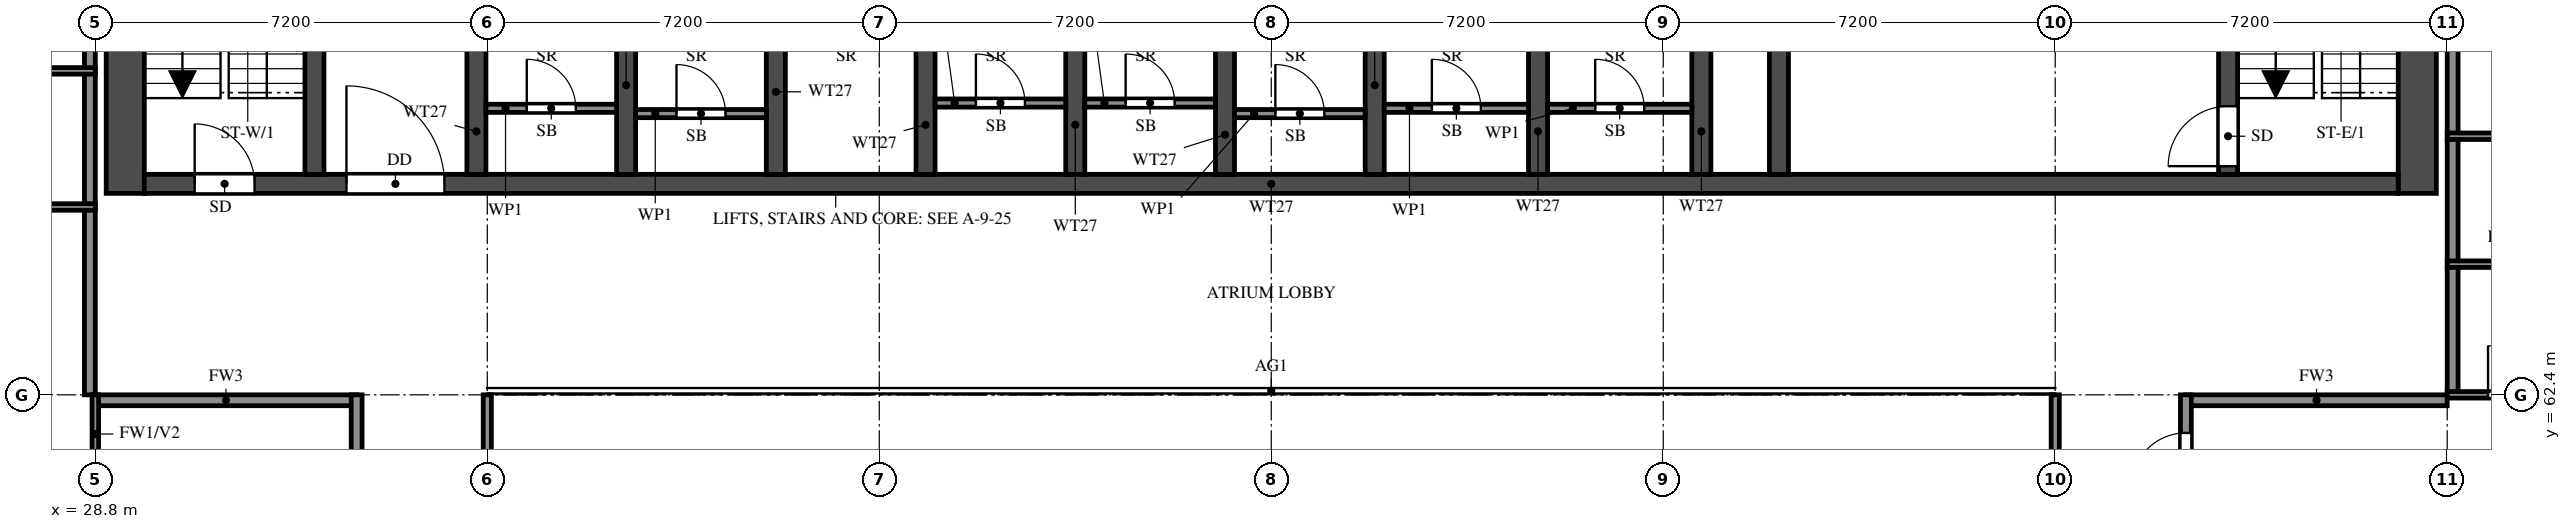
"""IFC4 building model, lengths in metres.
Left out: names, types, materials, properties, quantities, classifications, styles, units other than length and angle.
Written with IfcOpenShell. Run it as: python <this file> out.ifc"""

import sys

from ifc_helpers import new_model, si_unit, direction, frame, frame_2d, origin, place, context, subcontext, project, spatial, rectangle, extrude, element, fill, save


model = new_model("IFC4")
c1 = context("Model", 3, precision=1e-05, world=origin(), true_north=direction((0.0, 1.0)))
c2 = subcontext(c1, "Body", "Model", "MODEL_VIEW")
j1 = project(units=[si_unit("LENGTHUNIT", "METRE"), si_unit("PLANEANGLEUNIT", "RADIAN")], contexts=[c1])
p1 = place(None, origin())
s1 = spatial("IfcSite", under=j1, at=p1, CompositionType="ELEMENT")
p2 = place(p1, origin())
s2 = spatial("IfcBuilding", under=s1, at=p2, CompositionType="ELEMENT")
p3 = place(p2, frame((0.0, 0.0, 185.0)))
s3 = spatial("IfcBuildingStorey", under=s2, at=p3, CompositionType="ELEMENT", Elevation=185.0)
for number, where, z_axis, x_axis in (
    (1, (29.35, 66.1, 0.0), (0.0, 0.0, 1.0), (0.0, 1.0, 0.0)),
    (2, (71.45, 66.1, 0.0), (0.0, 0.0, 1.0), (0.0, 1.0, 0.0)),
):
    element("IfcWall", number, at=place(p3, frame(where, z_axis=z_axis, x_axis=x_axis)), inside=s3, PredefinedType="SHEAR", context=c2, shape_type="SweptSolid", body=[
        extrude(rectangle(XDim=11.9, YDim=0.7, at=frame_2d((5.95, 0.0))), origin(), (0.0, 0.0, 1.0), 3.2),
    ])
p4 = place(p3, frame((29.7, 66.275, 0.0), z_axis=(0.0, 0.0, 1.0), x_axis=(1.0, 0.0, 0.0)))
e3 = element("IfcWall", 3, at=p4, inside=s3, PredefinedType="SHEAR", context=c2, shape_type="SweptSolid", body=[
    extrude(rectangle(XDim=41.4, YDim=0.35, at=frame_2d((20.7, 0.0))), origin(), (0.0, 0.0, 1.0), 3.2),
])
p5 = place(p4, frame((0.925, 0.0, 0.0)))
e4 = element("IfcOpeningElement", 4, at=p5, cuts=e3, PredefinedType="OPENING", context=c2, shape_type="SweptSolid", body=[
    extrude(rectangle(XDim=1.1, YDim=2.1, at=frame_2d((0.55, 1.05))), frame((0.0, 0.185, 0.0), z_axis=(0.0, -1.0, 0.0), x_axis=(1.0, 0.0, 0.0)), (0.0, 0.0, 1.0), 0.37),
])
p6 = place(p4, frame((3.712, 0.0, 0.0)))
e5 = element("IfcOpeningElement", 5, at=p6, cuts=e3, PredefinedType="OPENING", context=c2, shape_type="SweptSolid", body=[
    extrude(rectangle(XDim=1.8, YDim=2.1, at=frame_2d((0.9, 1.05))), frame((0.0, 0.185, 0.0), z_axis=(0.0, -1.0, 0.0), x_axis=(1.0, 0.0, 0.0)), (0.0, 0.0, 1.0), 0.37),
])
p7 = place(p3, frame((32.825, 66.45, 0.0), z_axis=(0.0, 0.0, 1.0), x_axis=(0.0, 1.0, 0.0)))
e6 = element("IfcWall", 6, at=p7, inside=s3, PredefinedType="SHEAR", context=c2, shape_type="SweptSolid", body=[
    extrude(rectangle(XDim=10.85, YDim=0.35, at=frame_2d((5.425, 0.0))), origin(), (0.0, 0.0, 1.0), 3.2),
])
p8 = place(p3, frame((67.975, 66.45, 0.0), z_axis=(0.0, 0.0, 1.0), x_axis=(0.0, 1.0, 0.0)))
e7 = element("IfcWall", 7, at=p8, inside=s3, PredefinedType="SHEAR", context=c2, shape_type="SweptSolid", body=[
    extrude(rectangle(XDim=10.85, YDim=0.35, at=frame_2d((5.425, 0.0))), origin(), (0.0, 0.0, 1.0), 3.2),
])
p9 = place(p8, frame((0.15, 0.0, 0.0)))
e8 = element("IfcOpeningElement", 8, at=p9, cuts=e7, PredefinedType="OPENING", context=c2, shape_type="SweptSolid", body=[
    extrude(rectangle(XDim=1.1, YDim=2.1, at=frame_2d((0.55, 1.05))), frame((0.0, 0.185, 0.0), z_axis=(0.0, -1.0, 0.0), x_axis=(1.0, 0.0, 0.0)), (0.0, 0.0, 1.0), 0.37),
])
p10 = place(p3, frame((59.725, 66.45, 0.0), z_axis=(0.0, 0.0, 1.0), x_axis=(0.0, 1.0, 0.0)))
e9 = element("IfcWall", 9, at=p10, inside=s3, PredefinedType="SHEAR", context=c2, shape_type="SweptSolid", body=[
    extrude(rectangle(XDim=6.125, YDim=0.35, at=frame_2d((3.062, 0.0))), origin(), (0.0, 0.0, 1.0), 3.2),
])
p11 = place(p10, frame((3.85, 0.0, 0.0)))
e10 = element("IfcOpeningElement", 10, at=p11, cuts=e9, PredefinedType="OPENING", context=c2, shape_type="SweptSolid", body=[
    extrude(rectangle(XDim=1.2, YDim=2.1, at=frame_2d((0.6, 1.05))), frame((0.0, 0.185, 0.0), z_axis=(0.0, -1.0, 0.0), x_axis=(1.0, 0.0, 0.0)), (0.0, 0.0, 1.0), 0.37),
])
for number, where, z_axis, x_axis in (
    (11, (35.8, 66.45, 0.0), (0.0, 0.0, 1.0), (0.0, 1.0, 0.0)),
    (12, (38.55, 66.45, 0.0), (0.0, 0.0, 1.0), (0.0, 1.0, 0.0)),
    (13, (41.3, 66.45, 0.0), (0.0, 0.0, 1.0), (0.0, 1.0, 0.0)),
    (14, (44.05, 66.45, 0.0), (0.0, 0.0, 1.0), (0.0, 1.0, 0.0)),
    (15, (46.8, 66.45, 0.0), (0.0, 0.0, 1.0), (0.0, 1.0, 0.0)),
    (16, (49.55, 66.45, 0.0), (0.0, 0.0, 1.0), (0.0, 1.0, 0.0)),
    (17, (52.3, 66.45, 0.0), (0.0, 0.0, 1.0), (0.0, 1.0, 0.0)),
    (18, (55.3, 66.45, 0.0), (0.0, 0.0, 1.0), (0.0, 1.0, 0.0)),
    (19, (58.3, 66.45, 0.0), (0.0, 0.0, 1.0), (0.0, 1.0, 0.0)),
):
    element("IfcWall", number, at=place(p3, frame(where, z_axis=z_axis, x_axis=x_axis)), inside=s3, PredefinedType="SHEAR", context=c2, shape_type="SweptSolid", body=[
        extrude(rectangle(XDim=2.425, YDim=0.35, at=frame_2d((1.212, 0.0))), origin(), (0.0, 0.0, 1.0), 3.2),
    ])
p12 = place(p3, frame((35.975, 67.663, 0.0), z_axis=(0.0, 0.0, 1.0), x_axis=(1.0, 0.0, 0.0)))
e20 = element("IfcWall", 20, at=p12, inside=s3, PredefinedType="PARTITIONING", context=c2, shape_type="SweptSolid", body=[
    extrude(rectangle(XDim=2.4, YDim=0.15, at=frame_2d((1.2, 0.0))), origin(), (0.0, 0.0, 1.0), 3.2),
])
p13 = place(p12, frame((0.75, 0.0, 0.0)))
e21 = element("IfcOpeningElement", 21, at=p13, cuts=e20, PredefinedType="OPENING", context=c2, shape_type="SweptSolid", body=[
    extrude(rectangle(XDim=0.9, YDim=2.1, at=frame_2d((0.45, 1.05))), frame((0.0, 0.085, 0.0), z_axis=(0.0, -1.0, 0.0), x_axis=(1.0, 0.0, 0.0)), (0.0, 0.0, 1.0), 0.17),
])
p14 = place(p3, frame((38.725, 67.565, 0.0), z_axis=(0.0, 0.0, 1.0), x_axis=(1.0, 0.0, 0.0)))
e22 = element("IfcWall", 22, at=p14, inside=s3, PredefinedType="PARTITIONING", context=c2, shape_type="SweptSolid", body=[
    extrude(rectangle(XDim=2.4, YDim=0.15, at=frame_2d((1.2, 0.0))), origin(), (0.0, 0.0, 1.0), 3.2),
])
p15 = place(p14, frame((0.75, 0.0, 0.0)))
e23 = element("IfcOpeningElement", 23, at=p15, cuts=e22, PredefinedType="OPENING", context=c2, shape_type="SweptSolid", body=[
    extrude(rectangle(XDim=0.9, YDim=2.1, at=frame_2d((0.45, 1.05))), frame((0.0, 0.085, 0.0), z_axis=(0.0, -1.0, 0.0), x_axis=(1.0, 0.0, 0.0)), (0.0, 0.0, 1.0), 0.17),
])
p16 = place(p3, frame((44.225, 67.76, 0.0), z_axis=(0.0, 0.0, 1.0), x_axis=(1.0, 0.0, 0.0)))
e24 = element("IfcWall", 24, at=p16, inside=s3, PredefinedType="PARTITIONING", context=c2, shape_type="SweptSolid", body=[
    extrude(rectangle(XDim=2.4, YDim=0.15, at=frame_2d((1.2, 0.0))), origin(), (0.0, 0.0, 1.0), 3.2),
])
p17 = place(p16, frame((0.75, 0.0, 0.0)))
e25 = element("IfcOpeningElement", 25, at=p17, cuts=e24, PredefinedType="OPENING", context=c2, shape_type="SweptSolid", body=[
    extrude(rectangle(XDim=0.9, YDim=2.1, at=frame_2d((0.45, 1.05))), frame((0.0, 0.085, 0.0), z_axis=(0.0, -1.0, 0.0), x_axis=(1.0, 0.0, 0.0)), (0.0, 0.0, 1.0), 0.17),
])
p18 = place(p3, frame((46.975, 67.76, 0.0), z_axis=(0.0, 0.0, 1.0), x_axis=(1.0, 0.0, 0.0)))
e26 = element("IfcWall", 26, at=p18, inside=s3, PredefinedType="PARTITIONING", context=c2, shape_type="SweptSolid", body=[
    extrude(rectangle(XDim=2.4, YDim=0.15, at=frame_2d((1.2, 0.0))), origin(), (0.0, 0.0, 1.0), 3.2),
])
p19 = place(p18, frame((0.75, 0.0, 0.0)))
e27 = element("IfcOpeningElement", 27, at=p19, cuts=e26, PredefinedType="OPENING", context=c2, shape_type="SweptSolid", body=[
    extrude(rectangle(XDim=0.9, YDim=2.1, at=frame_2d((0.45, 1.05))), frame((0.0, 0.085, 0.0), z_axis=(0.0, -1.0, 0.0), x_axis=(1.0, 0.0, 0.0)), (0.0, 0.0, 1.0), 0.17),
])
p20 = place(p3, frame((49.725, 67.565, 0.0), z_axis=(0.0, 0.0, 1.0), x_axis=(1.0, 0.0, 0.0)))
e28 = element("IfcWall", 28, at=p20, inside=s3, PredefinedType="PARTITIONING", context=c2, shape_type="SweptSolid", body=[
    extrude(rectangle(XDim=2.4, YDim=0.15, at=frame_2d((1.2, 0.0))), origin(), (0.0, 0.0, 1.0), 3.2),
])
p21 = place(p20, frame((0.75, 0.0, 0.0)))
e29 = element("IfcOpeningElement", 29, at=p21, cuts=e28, PredefinedType="OPENING", context=c2, shape_type="SweptSolid", body=[
    extrude(rectangle(XDim=0.9, YDim=2.1, at=frame_2d((0.45, 1.05))), frame((0.0, 0.085, 0.0), z_axis=(0.0, -1.0, 0.0), x_axis=(1.0, 0.0, 0.0)), (0.0, 0.0, 1.0), 0.17),
])
p22 = place(p3, frame((52.475, 67.663, 0.0), z_axis=(0.0, 0.0, 1.0), x_axis=(1.0, 0.0, 0.0)))
e30 = element("IfcWall", 30, at=p22, inside=s3, PredefinedType="PARTITIONING", context=c2, shape_type="SweptSolid", body=[
    extrude(rectangle(XDim=2.65, YDim=0.15, at=frame_2d((1.325, 0.0))), origin(), (0.0, 0.0, 1.0), 3.2),
])
p23 = place(p22, frame((0.875, 0.0, 0.0)))
e31 = element("IfcOpeningElement", 31, at=p23, cuts=e30, PredefinedType="OPENING", context=c2, shape_type="SweptSolid", body=[
    extrude(rectangle(XDim=0.9, YDim=2.1, at=frame_2d((0.45, 1.05))), frame((0.0, 0.085, 0.0), z_axis=(0.0, -1.0, 0.0), x_axis=(1.0, 0.0, 0.0)), (0.0, 0.0, 1.0), 0.17),
])
p24 = place(p3, frame((55.475, 67.663, 0.0), z_axis=(0.0, 0.0, 1.0), x_axis=(1.0, 0.0, 0.0)))
e32 = element("IfcWall", 32, at=p24, inside=s3, PredefinedType="PARTITIONING", context=c2, shape_type="SweptSolid", body=[
    extrude(rectangle(XDim=2.65, YDim=0.15, at=frame_2d((1.325, 0.0))), origin(), (0.0, 0.0, 1.0), 3.2),
])
p25 = place(p24, frame((0.875, 0.0, 0.0)))
e33 = element("IfcOpeningElement", 33, at=p25, cuts=e32, PredefinedType="OPENING", context=c2, shape_type="SweptSolid", body=[
    extrude(rectangle(XDim=0.9, YDim=2.1, at=frame_2d((0.45, 1.05))), frame((0.0, 0.085, 0.0), z_axis=(0.0, -1.0, 0.0), x_axis=(1.0, 0.0, 0.0)), (0.0, 0.0, 1.0), 0.17),
])
for number, where, z_axis, x_axis in (
    (34, (28.8, 62.3, 0.0), (0.0, 0.0, 1.0), (1.0, 0.0, 0.0)),
    (35, (67.2, 62.3, 0.0), (0.0, 0.0, 1.0), (1.0, 0.0, 0.0)),
):
    element("IfcWall", number, at=place(p3, frame(where, z_axis=z_axis, x_axis=x_axis)), inside=s3, PredefinedType="SOLIDWALL", context=c2, shape_type="SweptSolid", body=[
        extrude(rectangle(XDim=4.8, YDim=0.2, at=frame_2d((2.4, 0.0))), origin(), (0.0, 0.0, 1.0), 3.2),
    ])
p26 = place(p3, frame((28.7, 62.4, 0.0), z_axis=(0.0, 0.0, 1.0), x_axis=(0.0, 1.0, 0.0)))
e36 = element("IfcWall", 36, at=p26, inside=s3, PredefinedType="SOLIDWALL", context=c2, shape_type="SweptSolid", body=[
    extrude(rectangle(XDim=15.6, YDim=0.2, at=frame_2d((7.8, 0.0))), origin(), (0.0, 0.0, 1.0), 3.2),
])
p27 = place(p3, frame((33.6, 56.4, 0.0), z_axis=(0.0, 0.0, 1.0), x_axis=(0.0, 1.0, 0.0)))
e37 = element("IfcWall", 37, at=p27, inside=s3, PredefinedType="SOLIDWALL", context=c2, shape_type="SweptSolid", body=[
    extrude(rectangle(XDim=6.0, YDim=0.2, at=frame_2d((3.0, 0.0))), origin(), (0.0, 0.0, 1.0), 3.2),
])
p28 = place(p27, frame((3.7, 0.0, 0.0)))
e38 = element("IfcOpeningElement", 38, at=p28, cuts=e37, PredefinedType="OPENING", context=c2, shape_type="SweptSolid", body=[
    extrude(rectangle(XDim=1.0, YDim=2.1, at=frame_2d((0.5, 1.05))), frame((0.0, 0.11, 0.0), z_axis=(0.0, -1.0, 0.0), x_axis=(1.0, 0.0, 0.0)), (0.0, 0.0, 1.0), 0.22),
])
p29 = place(p3, frame((67.2, 45.6, 0.0), z_axis=(0.0, 0.0, 1.0), x_axis=(0.0, 1.0, 0.0)))
e39 = element("IfcWall", 39, at=p29, inside=s3, PredefinedType="SOLIDWALL", context=c2, shape_type="SweptSolid", body=[
    extrude(rectangle(XDim=16.8, YDim=0.2, at=frame_2d((8.4, 0.0))), origin(), (0.0, 0.0, 1.0), 3.2),
])
p30 = place(p29, frame((8.3, 0.0, 0.0)))
e40 = element("IfcOpeningElement", 40, at=p30, cuts=e39, PredefinedType="OPENING", context=c2, shape_type="SweptSolid", body=[
    extrude(rectangle(XDim=1.0, YDim=2.1, at=frame_2d((0.5, 1.05))), frame((0.0, 0.11, 0.0), z_axis=(0.0, -1.0, 0.0), x_axis=(1.0, 0.0, 0.0)), (0.0, 0.0, 1.0), 0.22),
])
p31 = place(p29, frame((15.1, 0.0, 0.0)))
e41 = element("IfcOpeningElement", 41, at=p31, cuts=e39, PredefinedType="OPENING", context=c2, shape_type="SweptSolid", body=[
    extrude(rectangle(XDim=1.0, YDim=2.1, at=frame_2d((0.5, 1.05))), frame((0.0, 0.11, 0.0), z_axis=(0.0, -1.0, 0.0), x_axis=(1.0, 0.0, 0.0)), (0.0, 0.0, 1.0), 0.22),
])
p32 = place(p29, frame((0.7, 0.0, 0.0)))
e42 = element("IfcOpeningElement", 42, at=p32, cuts=e39, PredefinedType="OPENING", context=c2, shape_type="SweptSolid", body=[
    extrude(rectangle(XDim=1.0, YDim=2.1, at=frame_2d((0.5, 1.05))), frame((0.0, 0.11, 0.0), z_axis=(0.0, -1.0, 0.0), x_axis=(1.0, 0.0, 0.0)), (0.0, 0.0, 1.0), 0.22),
])
p33 = place(p3, frame((72.1, 62.4, 0.0), z_axis=(0.0, 0.0, 1.0), x_axis=(0.0, 1.0, 0.0)))
e43 = element("IfcWall", 43, at=p33, inside=s3, PredefinedType="SOLIDWALL", context=c2, shape_type="SweptSolid", body=[
    extrude(rectangle(XDim=15.6, YDim=0.2, at=frame_2d((7.8, 0.0))), origin(), (0.0, 0.0, 1.0), 3.2),
])
p34 = place(p3, frame((72.0, 62.4, 0.0), z_axis=(0.0, 0.0, 1.0), x_axis=(1.0, 0.0, 0.0)))
e44 = element("IfcWall", 44, at=p34, inside=s3, PredefinedType="PARTITIONING", context=c2, shape_type="SweptSolid", body=[
    extrude(rectangle(XDim=2.4, YDim=0.12, at=frame_2d((1.2, 0.0))), origin(), (0.0, 0.0, 1.0), 3.2),
])
p35 = place(p34, frame((0.75, 0.0, 0.0)))
e45 = element("IfcOpeningElement", 45, at=p35, cuts=e44, PredefinedType="OPENING", context=c2, shape_type="SweptSolid", body=[
    extrude(rectangle(XDim=0.9, YDim=2.1, at=frame_2d((0.45, 1.05))), frame((0.0, 0.07, 0.0), z_axis=(0.0, -1.0, 0.0), x_axis=(1.0, 0.0, 0.0)), (0.0, 0.0, 1.0), 0.14),
])
p36 = place(p3, frame((72.0, 64.8, 0.0), z_axis=(0.0, 0.0, 1.0), x_axis=(1.0, 0.0, 0.0)))
e46 = element("IfcWall", 46, at=p36, inside=s3, PredefinedType="PARTITIONING", context=c2, shape_type="SweptSolid", body=[
    extrude(rectangle(XDim=5.1, YDim=0.12, at=frame_2d((2.55, 0.0))), origin(), (0.0, 0.0, 1.0), 3.2),
])
p37 = place(p36, frame((2.15, 0.0, 0.0)))
e47 = element("IfcOpeningElement", 47, at=p37, cuts=e46, PredefinedType="OPENING", context=c2, shape_type="SweptSolid", body=[
    extrude(rectangle(XDim=0.8, YDim=2.1, at=frame_2d((0.4, 1.05))), frame((0.0, 0.07, 0.0), z_axis=(0.0, -1.0, 0.0), x_axis=(1.0, 0.0, 0.0)), (0.0, 0.0, 1.0), 0.14),
])
for number, where, z_axis, x_axis in (
    (48, (23.7, 65.85, 0.0), (0.0, 0.0, 1.0), (1.0, 0.0, 0.0)),
    (49, (72.0, 67.15, 0.0), (0.0, 0.0, 1.0), (1.0, 0.0, 0.0)),
    (50, (23.7, 68.35, 0.0), (0.0, 0.0, 1.0), (1.0, 0.0, 0.0)),
):
    element("IfcWall", number, at=place(p3, frame(where, z_axis=z_axis, x_axis=x_axis)), inside=s3, PredefinedType="PARTITIONING", context=c2, shape_type="SweptSolid", body=[
        extrude(rectangle(XDim=5.1, YDim=0.12, at=frame_2d((2.55, 0.0))), origin(), (0.0, 0.0, 1.0), 3.2),
    ])
p38 = place(p3, frame((28.8, 58.8, 0.0), z_axis=(0.0, 0.0, 1.0), x_axis=(0.0, 1.0, 0.0)))
e51 = element("IfcWall", 51, at=p38, inside=s3, PredefinedType="PARTITIONING", context=c2, shape_type="SweptSolid", body=[
    extrude(rectangle(XDim=3.6, YDim=0.12, at=frame_2d((1.8, 0.0))), origin(), (0.0, 0.0, 1.0), 3.2),
])
p39 = place(p38, frame((0.75, 0.0, 0.0)))
e52 = element("IfcOpeningElement", 52, at=p39, cuts=e51, PredefinedType="OPENING", context=c2, shape_type="SweptSolid", body=[
    extrude(rectangle(XDim=0.9, YDim=2.1, at=frame_2d((0.45, 1.05))), frame((0.0, 0.07, 0.0), z_axis=(0.0, -1.0, 0.0), x_axis=(1.0, 0.0, 0.0)), (0.0, 0.0, 1.0), 0.14),
])
for number, where, z_axis, x_axis in (
    (53, (36.0, 48.0, 0.0), (0.0, 0.0, 1.0), (0.0, 1.0, 0.0)),
    (54, (64.8, 48.0, 0.0), (0.0, 0.0, 1.0), (0.0, 1.0, 0.0)),
):
    element("IfcWall", number, at=place(p3, frame(where, z_axis=z_axis, x_axis=x_axis)), inside=s3, PredefinedType="SOLIDWALL", context=c2, shape_type="SweptSolid", body=[
        extrude(rectangle(XDim=14.4, YDim=0.15, at=frame_2d((7.2, 0.0))), origin(), (0.0, 0.0, 1.0), 2.3),
    ])
p40 = place(p5, origin())
e55 = element("IfcDoor", 55, at=p40, inside=s3, OperationType="SINGLE_SWING_LEFT", PredefinedType="DOOR", context=c2, shape_type="SweptSolid", body=[
    extrude(rectangle(XDim=1.1, YDim=2.1, at=frame_2d((0.55, 1.05))), frame((0.0, 0.025, 0.0), z_axis=(0.0, -1.0, 0.0), x_axis=(1.0, 0.0, 0.0)), (0.0, 0.0, 1.0), 0.05),
])
fill(e4, e55)
p41 = place(p9, origin())
e56 = element("IfcDoor", 56, at=p41, inside=s3, OperationType="SINGLE_SWING_LEFT", PredefinedType="DOOR", context=c2, shape_type="SweptSolid", body=[
    extrude(rectangle(XDim=1.1, YDim=2.1, at=frame_2d((0.55, 1.05))), frame((0.0, 0.025, 0.0), z_axis=(0.0, -1.0, 0.0), x_axis=(1.0, 0.0, 0.0)), (0.0, 0.0, 1.0), 0.05),
])
fill(e8, e56)
p42 = place(p6, origin())
e57 = element("IfcDoor", 57, at=p42, inside=s3, OperationType="DOUBLE_DOOR_SINGLE_SWING", PredefinedType="DOOR", context=c2, shape_type="SweptSolid", body=[
    extrude(rectangle(XDim=1.8, YDim=2.1, at=frame_2d((0.9, 1.05))), frame((0.0, 0.025, 0.0), z_axis=(0.0, -1.0, 0.0), x_axis=(1.0, 0.0, 0.0)), (0.0, 0.0, 1.0), 0.05),
])
fill(e5, e57)
p43 = place(p13, origin())
e58 = element("IfcDoor", 58, at=p43, inside=s3, OperationType="SINGLE_SWING_RIGHT", PredefinedType="DOOR", context=c2, shape_type="SweptSolid", body=[
    extrude(rectangle(XDim=0.9, YDim=2.1, at=frame_2d((0.45, 1.05))), frame((0.0, 0.025, 0.0), z_axis=(0.0, -1.0, 0.0), x_axis=(1.0, 0.0, 0.0)), (0.0, 0.0, 1.0), 0.05),
])
fill(e21, e58)
p44 = place(p15, origin())
e59 = element("IfcDoor", 59, at=p44, inside=s3, OperationType="SINGLE_SWING_LEFT", PredefinedType="DOOR", context=c2, shape_type="SweptSolid", body=[
    extrude(rectangle(XDim=0.9, YDim=2.1, at=frame_2d((0.45, 1.05))), frame((0.0, 0.025, 0.0), z_axis=(0.0, -1.0, 0.0), x_axis=(1.0, 0.0, 0.0)), (0.0, 0.0, 1.0), 0.05),
])
fill(e23, e59)
p45 = place(p17, origin())
e60 = element("IfcDoor", 60, at=p45, inside=s3, OperationType="SINGLE_SWING_RIGHT", PredefinedType="DOOR", context=c2, shape_type="SweptSolid", body=[
    extrude(rectangle(XDim=0.9, YDim=2.1, at=frame_2d((0.45, 1.05))), frame((0.0, 0.025, 0.0), z_axis=(0.0, -1.0, 0.0), x_axis=(1.0, 0.0, 0.0)), (0.0, 0.0, 1.0), 0.05),
])
fill(e25, e60)
p46 = place(p19, origin())
e61 = element("IfcDoor", 61, at=p46, inside=s3, OperationType="SINGLE_SWING_LEFT", PredefinedType="DOOR", context=c2, shape_type="SweptSolid", body=[
    extrude(rectangle(XDim=0.9, YDim=2.1, at=frame_2d((0.45, 1.05))), frame((0.0, 0.025, 0.0), z_axis=(0.0, -1.0, 0.0), x_axis=(1.0, 0.0, 0.0)), (0.0, 0.0, 1.0), 0.05),
])
fill(e27, e61)
p47 = place(p21, origin())
e62 = element("IfcDoor", 62, at=p47, inside=s3, OperationType="SINGLE_SWING_LEFT", PredefinedType="DOOR", context=c2, shape_type="SweptSolid", body=[
    extrude(rectangle(XDim=0.9, YDim=2.1, at=frame_2d((0.45, 1.05))), frame((0.0, 0.025, 0.0), z_axis=(0.0, -1.0, 0.0), x_axis=(1.0, 0.0, 0.0)), (0.0, 0.0, 1.0), 0.05),
])
fill(e29, e62)
p48 = place(p23, origin())
e63 = element("IfcDoor", 63, at=p48, inside=s3, OperationType="SINGLE_SWING_LEFT", PredefinedType="DOOR", context=c2, shape_type="SweptSolid", body=[
    extrude(rectangle(XDim=0.9, YDim=2.1, at=frame_2d((0.45, 1.05))), frame((0.0, 0.025, 0.0), z_axis=(0.0, -1.0, 0.0), x_axis=(1.0, 0.0, 0.0)), (0.0, 0.0, 1.0), 0.05),
])
fill(e31, e63)
p49 = place(p25, origin())
e64 = element("IfcDoor", 64, at=p49, inside=s3, OperationType="SINGLE_SWING_LEFT", PredefinedType="DOOR", context=c2, shape_type="SweptSolid", body=[
    extrude(rectangle(XDim=0.9, YDim=2.1, at=frame_2d((0.45, 1.05))), frame((0.0, 0.025, 0.0), z_axis=(0.0, -1.0, 0.0), x_axis=(1.0, 0.0, 0.0)), (0.0, 0.0, 1.0), 0.05),
])
fill(e33, e64)
p50 = place(p35, origin())
e65 = element("IfcDoor", 65, at=p50, inside=s3, OperationType="SINGLE_SWING_LEFT", PredefinedType="DOOR", context=c2, shape_type="SweptSolid", body=[
    extrude(rectangle(XDim=0.9, YDim=2.1, at=frame_2d((0.45, 1.05))), frame((0.0, 0.025, 0.0), z_axis=(0.0, -1.0, 0.0), x_axis=(1.0, 0.0, 0.0)), (0.0, 0.0, 1.0), 0.05),
])
fill(e45, e65)
p51 = place(p31, origin())
e66 = element("IfcDoor", 66, at=p51, inside=s3, OperationType="SINGLE_SWING_LEFT", PredefinedType="DOOR", context=c2, shape_type="SweptSolid", body=[
    extrude(rectangle(XDim=1.0, YDim=2.1, at=frame_2d((0.5, 1.05))), frame((0.0, 0.025, 0.0), z_axis=(0.0, -1.0, 0.0), x_axis=(1.0, 0.0, 0.0)), (0.0, 0.0, 1.0), 0.05),
])
fill(e41, e66)
save(model, sys.argv[1])
